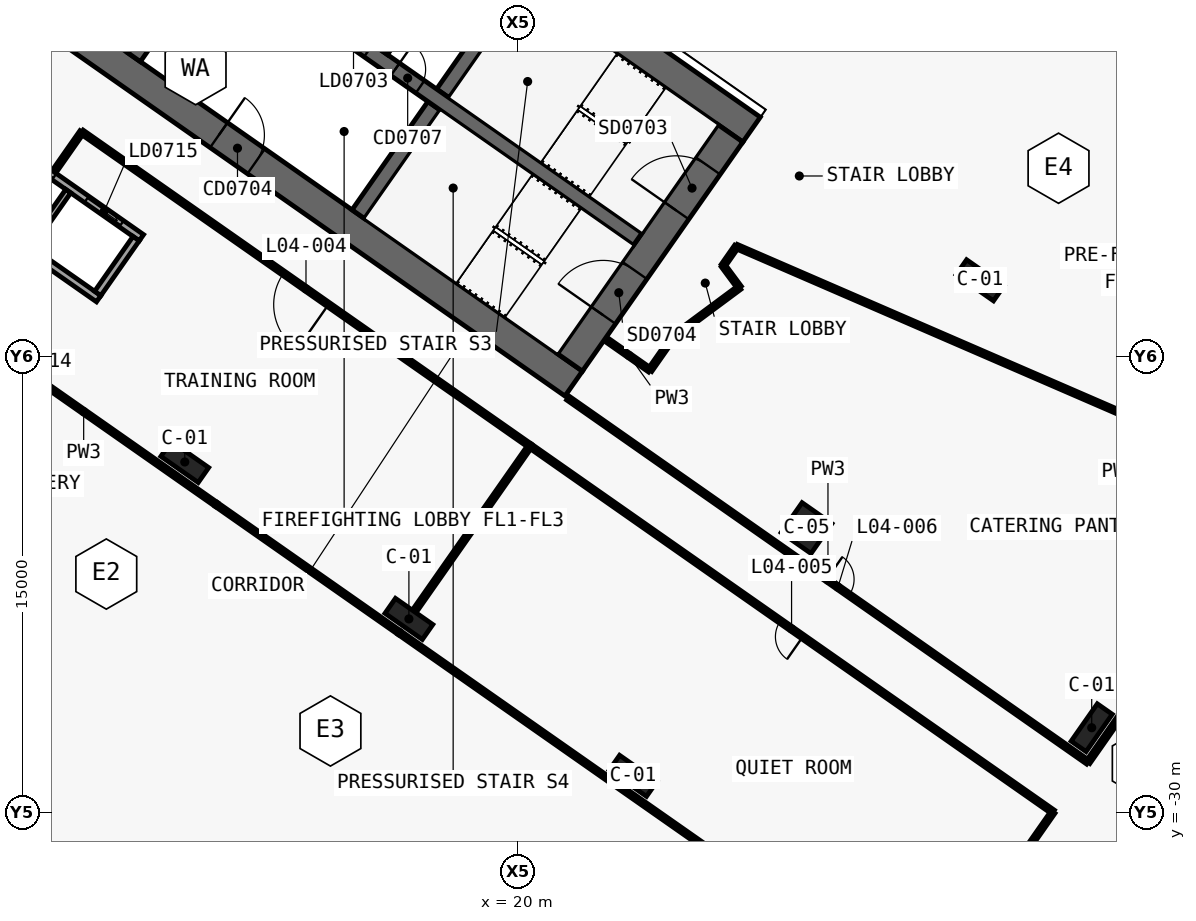
"""IFC4 building model, lengths in metres.
Left out: names, types, materials, properties, quantities, classifications, styles, units other than length and angle.
Written with IfcOpenShell. Run it as: python <this file> out.ifc"""

import sys

from ifc_helpers import new_model, si_unit, direction, frame, frame_2d, origin, origin_2d, place, context, subcontext, project, spatial, polyline, rectangle, outline, extrude, element, fill, save


model = new_model("IFC4")
c1 = context("Model", 3, precision=1e-05, world=origin(), true_north=direction((0.0, 1.0)))
c2 = subcontext(c1, "Body", "Model", "MODEL_VIEW")
j1 = project(units=[si_unit("LENGTHUNIT", "METRE"), si_unit("PLANEANGLEUNIT", "RADIAN")], contexts=[c1])
p1 = place(None, origin())
s1 = spatial("IfcSite", under=j1, at=p1, CompositionType="ELEMENT")
p2 = place(p1, origin())
s2 = spatial("IfcBuilding", under=s1, at=p2, CompositionType="ELEMENT")
p3 = place(p2, frame((0.0, 0.0, 32.0)))
s3 = spatial("IfcBuildingStorey", under=s2, at=p3, CompositionType="ELEMENT", Elevation=32.0)
p4 = place(p3, frame((-0.037, 11.867, 0.0), z_axis=(0.0, 0.0, 1.0), x_axis=(0.819155306259, -0.573571777746, 0.0)))
e1 = element("IfcWall", 1, at=p4, inside=s3, PredefinedType="SHEAR", context=c2, shape_type="SweptSolid", body=[
    extrude(outline(polyline([(33.837, 0.5), (0.0, 0.5), (0.7, -0.5), (33.837, -0.5), (33.837, 0.5)])), origin(), (0.0, 0.0, 1.0), 5.5),
])
p5 = place(p3, frame((-0.037, -0.585, 0.0), z_axis=(0.0, 0.0, 1.0), x_axis=(0.819157152511, -0.573569140985, 0.0)))
e2 = element("IfcWall", 2, at=p5, inside=s3, PredefinedType="SHEAR", context=c2, shape_type="SweptSolid", body=[
    extrude(outline(polyline([(26.695, 0.5), (0.0, 0.5), (0.7, -0.5), (26.695, -0.5), (26.695, 0.5)])), origin(), (0.0, 0.0, 1.0), 5.5),
])
p6 = place(p5, frame((1.045, 0.0, 0.0)))
e3 = element("IfcOpeningElement", 3, at=p6, cuts=e2, PredefinedType="OPENING", context=c2, shape_type="SweptSolid", body=[
    extrude(rectangle(XDim=1.5, YDim=2.1, at=frame_2d((0.75, 1.05))), frame((0.0, 0.51, 0.0), z_axis=(0.0, -1.0, 0.0), x_axis=(1.0, 0.0, 0.0)), (0.0, 0.0, 1.0), 1.02),
])
p7 = place(p5, frame((12.445, 0.0, 0.0)))
e4 = element("IfcOpeningElement", 4, at=p7, cuts=e2, PredefinedType="OPENING", context=c2, shape_type="SweptSolid", body=[
    extrude(rectangle(XDim=1.5, YDim=2.1, at=frame_2d((0.75, 1.05))), frame((0.0, 0.51, 0.0), z_axis=(0.0, -1.0, 0.0), x_axis=(1.0, 0.0, 0.0)), (0.0, 0.0, 1.0), 1.02),
])
p8 = place(p3, frame((21.708, -15.2, 0.0), z_axis=(0.0, 0.0, 1.0), x_axis=(0.573576324356, 0.819152122709, 0.0)))
e5 = element("IfcWall", 5, at=p8, inside=s3, PredefinedType="SHEAR", context=c2, shape_type="SweptSolid", body=[
    extrude(outline(polyline([(9.2, 0.5), (0.0, 0.5), (0.0, -0.5), (9.2, -0.5), (9.2, 0.5)])), origin(), (0.0, 0.0, 1.0), 5.5),
])
p9 = place(p8, frame((6.1, 0.0, 0.0)))
e6 = element("IfcOpeningElement", 6, at=p9, cuts=e5, PredefinedType="OPENING", context=c2, shape_type="SweptSolid", body=[
    extrude(rectangle(XDim=1.8, YDim=2.1, at=frame_2d((0.9, 1.05))), frame((0.0, 0.51, 0.0), z_axis=(0.0, -1.0, 0.0), x_axis=(1.0, 0.0, 0.0)), (0.0, 0.0, 1.0), 1.02),
])
p10 = place(p8, frame((1.9, 0.0, 0.0)))
e7 = element("IfcOpeningElement", 7, at=p10, cuts=e5, PredefinedType="OPENING", context=c2, shape_type="SweptSolid", body=[
    extrude(rectangle(XDim=1.8, YDim=2.1, at=frame_2d((0.9, 1.05))), frame((0.0, 0.51, 0.0), z_axis=(0.0, -1.0, 0.0), x_axis=(1.0, 0.0, 0.0)), (0.0, 0.0, 1.0), 1.02),
])
p11 = place(p3, frame((7.372, -5.162, 0.0), z_axis=(0.0, 0.0, 1.0), x_axis=(0.573594173421, 0.819139624372, 0.0)))
e8 = element("IfcWall", 8, at=p11, inside=s3, PredefinedType="SHEAR", context=c2, shape_type="SweptSolid", body=[
    extrude(outline(polyline([(0.0, 0.25), (0.0, -0.25), (4.35, -0.25), (4.35, 0.25), (0.0, 0.25)])), origin(), (0.0, 0.0, 1.0), 5.5),
])
p12 = place(p3, frame((14.745, -10.324, 0.0), z_axis=(0.0, 0.0, 1.0), x_axis=(0.57356780395, 0.819158088694, 0.0)))
e9 = element("IfcWall", 9, at=p12, inside=s3, PredefinedType="SHEAR", context=c2, shape_type="SweptSolid", body=[
    extrude(outline(polyline([(0.0, 0.25), (0.0, -0.25), (4.35, -0.25), (4.35, 0.25), (0.0, 0.25)])), origin(), (0.0, 0.0, 1.0), 5.5),
])
p13 = place(p3, frame((17.527, -6.352, 0.0), z_axis=(0.0, 0.0, 1.0), x_axis=(0.573530143085, 0.819184457233, 0.0)))
e10 = element("IfcWall", 10, at=p13, inside=s3, PredefinedType="SHEAR", context=c2, shape_type="SweptSolid", body=[
    extrude(outline(polyline([(4.35, -0.25), (4.35, 0.25), (0.0, 0.25), (0.0, -0.25), (4.35, -0.25)])), origin(), (0.0, 0.0, 1.0), 5.5),
])
p14 = place(p3, frame((2.638, 3.768, 0.0), z_axis=(0.0, 0.0, 1.0), x_axis=(0.819148977158, -0.573580816643, 0.0)))
e11 = element("IfcWall", 11, at=p14, inside=s3, PredefinedType="SHEAR", context=c2, shape_type="SweptSolid", body=[
    extrude(outline(polyline([(0.0, 0.25), (0.0, -0.25), (26.0, -0.25), (26.0, 0.25), (0.0, 0.25)])), origin(), (0.0, 0.0, 1.0), 5.5),
])
p15 = place(p14, frame((9.637, 0.0, 0.0)))
e12 = element("IfcOpeningElement", 12, at=p15, cuts=e11, PredefinedType="OPENING", context=c2, shape_type="SweptSolid", body=[
    extrude(rectangle(XDim=1.2, YDim=2.1, at=frame_2d((0.6, 1.05))), frame((0.0, 0.26, 0.0), z_axis=(0.0, -1.0, 0.0), x_axis=(1.0, 0.0, 0.0)), (0.0, 0.0, 1.0), 0.52),
])
p16 = place(p14, frame((11.812, 0.0, 0.0)))
e13 = element("IfcOpeningElement", 13, at=p16, cuts=e11, PredefinedType="OPENING", context=c2, shape_type="SweptSolid", body=[
    extrude(rectangle(XDim=1.2, YDim=2.1, at=frame_2d((0.6, 1.05))), frame((0.0, 0.26, 0.0), z_axis=(0.0, -1.0, 0.0), x_axis=(1.0, 0.0, 0.0)), (0.0, 0.0, 1.0), 0.52),
])
p17 = place(p14, frame((13.988, 0.0, 0.0)))
e14 = element("IfcOpeningElement", 14, at=p17, cuts=e11, PredefinedType="OPENING", context=c2, shape_type="SweptSolid", body=[
    extrude(rectangle(XDim=1.2, YDim=2.1, at=frame_2d((0.6, 1.05))), frame((0.0, 0.26, 0.0), z_axis=(0.0, -1.0, 0.0), x_axis=(1.0, 0.0, 0.0)), (0.0, 0.0, 1.0), 0.52),
])
p18 = place(p14, frame((16.262, 0.0, 0.0)))
e15 = element("IfcOpeningElement", 15, at=p18, cuts=e11, PredefinedType="OPENING", context=c2, shape_type="SweptSolid", body=[
    extrude(rectangle(XDim=1.0, YDim=2.1, at=frame_2d((0.5, 1.05))), frame((0.0, 0.26, 0.0), z_axis=(0.0, -1.0, 0.0), x_axis=(1.0, 0.0, 0.0)), (0.0, 0.0, 1.0), 0.52),
])
for number, where, z_axis, x_axis in (
    (16, (9.038, -18.475, 0.0), (0.0, 0.0, 1.0), (0.819, -0.574, 0.0)),
    (17, (16.41, -23.637, 0.0), (0.0, 0.0, 1.0), (0.819, -0.574, 0.0)),
    (18, (23.782, -28.799, 0.0), (0.0, 0.0, 1.0), (0.819, -0.574, 0.0)),
    (19, (35.197, -12.498, 0.0), (0.0, 0.0, 1.0), (0.819, -0.574, 0.0)),
    (20, (38.869, -27.216, 0.0), (0.0, 0.0, 1.0), (0.574, 0.819, 0.0)),
):
    element("IfcColumn", number, at=place(p3, frame(where, z_axis=z_axis, x_axis=x_axis)), inside=s3, PredefinedType="COLUMN", context=c2, shape_type="SweptSolid", body=[
        extrude(rectangle(XDim=1.5, YDim=0.6, at=origin_2d()), origin(), (0.0, 0.0, 1.0), 5.5),
    ])
p19 = place(p3, frame((29.49, -20.649, 0.0), z_axis=(0.0, 0.0, 1.0), x_axis=(0.819152044289, -0.573576436351, 0.0)))
e21 = element("IfcColumn", 21, at=p19, inside=s3, PredefinedType="COLUMN", context=c2, shape_type="SweptSolid", body=[
    extrude(rectangle(XDim=1.2, YDim=1.2, at=origin_2d()), origin(), (0.0, 0.0, 1.0), 5.5),
])
p20 = place(p3, frame((15.622, -5.018, 0.0), z_axis=(0.0, 0.0, 1.0), x_axis=(0.573594173421, 0.819139624372, 0.0)))
e22 = element("IfcWall", 22, at=p20, inside=s3, PredefinedType="SOLIDWALL", context=c2, shape_type="SweptSolid", body=[
    extrude(rectangle(XDim=4.35, YDim=0.2, at=frame_2d((2.175, 0.0))), origin(), (0.0, 0.0, 1.0), 5.5),
])
p21 = place(p3, frame((-2.887, -6.738, 0.0), z_axis=(0.0, 0.0, 1.0), x_axis=(0.819150280716, -0.573578954985, 0.0)))
e23 = element("IfcWall", 23, at=p21, inside=s3, PredefinedType="SOLIDWALL", context=c2, shape_type="SweptSolid", body=[
    extrude(rectangle(XDim=11.1, YDim=0.25, at=frame_2d((5.55, 0.0))), origin(), (0.0, 0.0, 1.0), 5.5),
])
p22 = place(p3, frame((-1.481, -4.731, 0.0), z_axis=(0.0, 0.0, 1.0), x_axis=(0.819150280716, -0.573578954985, 0.0)))
e24 = element("IfcWall", 24, at=p22, inside=s3, PredefinedType="SOLIDWALL", context=c2, shape_type="SweptSolid", body=[
    extrude(rectangle(XDim=11.1, YDim=0.25, at=frame_2d((5.55, 0.0))), origin(), (0.0, 0.0, 1.0), 5.5),
])
p23 = place(p22, frame((0.8, 0.0, 0.0)))
e25 = element("IfcOpeningElement", 25, at=p23, cuts=e24, PredefinedType="OPENING", context=c2, shape_type="SweptSolid", body=[
    extrude(rectangle(XDim=1.4, YDim=2.1, at=frame_2d((0.7, 1.05))), frame((0.0, 0.135, 0.0), z_axis=(0.0, -1.0, 0.0), x_axis=(1.0, 0.0, 0.0)), (0.0, 0.0, 1.0), 0.27),
])
p24 = place(p22, frame((3.5, 0.0, 0.0)))
e26 = element("IfcOpeningElement", 26, at=p24, cuts=e24, PredefinedType="OPENING", context=c2, shape_type="SweptSolid", body=[
    extrude(rectangle(XDim=1.4, YDim=2.1, at=frame_2d((0.7, 1.05))), frame((0.0, 0.135, 0.0), z_axis=(0.0, -1.0, 0.0), x_axis=(1.0, 0.0, 0.0)), (0.0, 0.0, 1.0), 0.27),
])
p25 = place(p22, frame((6.2, 0.0, 0.0)))
e27 = element("IfcOpeningElement", 27, at=p25, cuts=e24, PredefinedType="OPENING", context=c2, shape_type="SweptSolid", body=[
    extrude(rectangle(XDim=1.4, YDim=2.1, at=frame_2d((0.7, 1.05))), frame((0.0, 0.135, 0.0), z_axis=(0.0, -1.0, 0.0), x_axis=(1.0, 0.0, 0.0)), (0.0, 0.0, 1.0), 0.27),
])
p26 = place(p22, frame((8.9, 0.0, 0.0)))
e28 = element("IfcOpeningElement", 28, at=p26, cuts=e24, PredefinedType="OPENING", context=c2, shape_type="SweptSolid", body=[
    extrude(rectangle(XDim=1.4, YDim=2.1, at=frame_2d((0.7, 1.05))), frame((0.0, 0.135, 0.0), z_axis=(0.0, -1.0, 0.0), x_axis=(1.0, 0.0, 0.0)), (0.0, 0.0, 1.0), 0.27),
])
p27 = place(p3, frame((6.175, -12.93, 0.0), z_axis=(0.0, 0.0, 1.0), x_axis=(0.573559170999, 0.819164133348, 0.0)))
e29 = element("IfcWall", 29, at=p27, inside=s3, PredefinedType="SOLIDWALL", context=c2, shape_type="SweptSolid", body=[
    extrude(rectangle(XDim=2.2, YDim=0.25, at=frame_2d((1.1, 0.0))), origin(), (0.0, 0.0, 1.0), 5.5),
])
p28 = place(p3, frame((3.943, -11.367, 0.0), z_axis=(0.0, 0.0, 1.0), x_axis=(0.573507030513, 0.819200638399, 0.0)))
e30 = element("IfcWall", 30, at=p28, inside=s3, PredefinedType="SOLIDWALL", context=c2, shape_type="SweptSolid", body=[
    extrude(rectangle(XDim=2.2, YDim=0.2, at=frame_2d((1.1, 0.0))), origin(), (0.0, 0.0, 1.0), 5.5),
])
p29 = place(p3, frame((21.642, -16.375, 0.0), z_axis=(0.0, 0.0, 1.0), x_axis=(0.819148965066, -0.573580833911, 0.0)))
e31 = element("IfcWall", 31, at=p29, inside=s3, PredefinedType="PARTITIONING", context=c2, shape_type="SweptSolid", body=[
    extrude(rectangle(XDim=20.88, YDim=0.15, at=frame_2d((10.44, 0.0))), origin(), (0.0, 0.0, 1.0), 3.68),
])
p30 = place(p29, frame((10.39, 0.0, 0.0)))
e32 = element("IfcOpeningElement", 32, at=p30, cuts=e31, PredefinedType="OPENING", context=c2, shape_type="SweptSolid", body=[
    extrude(rectangle(XDim=0.9, YDim=2.1, at=frame_2d((0.45, 1.05))), frame((0.0, 0.085, 0.0), z_axis=(0.0, -1.0, 0.0), x_axis=(1.0, 0.0, 0.0)), (0.0, 0.0, 1.0), 0.17),
])
p31 = place(p3, frame((20.398, -17.945, 0.0), z_axis=(0.0, 0.0, 1.0), x_axis=(-0.819147172988, 0.573583393228, 0.0)))
e33 = element("IfcWall", 33, at=p31, inside=s3, PredefinedType="PARTITIONING", context=c2, shape_type="SweptSolid", body=[
    extrude(rectangle(XDim=18.002, YDim=0.15, at=frame_2d((9.001, 0.0))), origin(), (0.0, 0.0, 1.0), 3.68),
])
p32 = place(p31, frame((8.101, 0.0, 0.0)))
e34 = element("IfcOpeningElement", 34, at=p32, cuts=e33, PredefinedType="OPENING", context=c2, shape_type="SweptSolid", body=[
    extrude(rectangle(XDim=1.8, YDim=2.4, at=frame_2d((0.9, 1.2))), frame((0.0, 0.085, 0.0), z_axis=(0.0, -1.0, 0.0), x_axis=(1.0, 0.0, 0.0)), (0.0, 0.0, 1.0), 0.17),
])
p33 = place(p3, frame((37.599, -29.989, 0.0), z_axis=(0.0, 0.0, 1.0), x_axis=(-0.819154909514, 0.573572344364, 0.0)))
e35 = element("IfcWall", 35, at=p33, inside=s3, PredefinedType="PARTITIONING", context=c2, shape_type="SweptSolid", body=[
    extrude(rectangle(XDim=21.002, YDim=0.15, at=frame_2d((10.501, 0.0))), origin(), (0.0, 0.0, 1.0), 3.68),
])
p34 = place(p33, frame((10.051, 0.0, 0.0)))
e36 = element("IfcOpeningElement", 36, at=p34, cuts=e35, PredefinedType="OPENING", context=c2, shape_type="SweptSolid", body=[
    extrude(rectangle(XDim=0.9, YDim=2.1, at=frame_2d((0.45, 1.05))), frame((0.0, 0.085, 0.0), z_axis=(0.0, -1.0, 0.0), x_axis=(1.0, 0.0, 0.0)), (0.0, 0.0, 1.0), 0.17),
])
p35 = place(p3, frame((43.621, -21.388, 0.0), z_axis=(0.0, 0.0, 1.0), x_axis=(-0.57357799764, -0.819150951061, 0.0)))
e37 = element("IfcWall", 37, at=p35, inside=s3, PredefinedType="PARTITIONING", context=c2, shape_type="SweptSolid", body=[
    extrude(rectangle(XDim=8.5, YDim=0.15, at=frame_2d((4.25, 0.0))), origin(), (0.0, 0.0, 1.0), 5.1),
])
p36 = place(p3, frame((26.746, -12.014, 0.0), z_axis=(0.0, 0.0, 1.0), x_axis=(0.573761975376, 0.819022097146, 0.0)))
e38 = element("IfcWall", 38, at=p36, inside=s3, PredefinedType="PARTITIONING", context=c2, shape_type="SweptSolid", body=[
    extrude(rectangle(XDim=0.765, YDim=0.15, at=frame_2d((0.383, 0.0))), origin(), (0.0, 0.0, 1.0), 5.1),
])
p37 = place(p3, frame((27.185, -11.387, 0.0), z_axis=(0.0, 0.0, 1.0), x_axis=(0.917531384635, -0.397663372979, 0.0)))
e39 = element("IfcWall", 39, at=p37, inside=s3, PredefinedType="PARTITIONING", context=c2, shape_type="SweptSolid", body=[
    extrude(rectangle(XDim=16.536, YDim=0.15, at=frame_2d((8.268, 0.0))), origin(), (0.0, 0.0, 1.0), 3.68),
])
p38 = place(p3, frame((22.961, -14.49, 0.0), z_axis=(0.0, 0.0, 1.0), x_axis=(0.819109000826, -0.573637903879, 0.0)))
e40 = element("IfcWall", 40, at=p38, inside=s3, PredefinedType="PARTITIONING", context=c2, shape_type="SweptSolid", body=[
    extrude(rectangle(XDim=1.68, YDim=0.15, at=frame_2d((0.84, 0.0))), origin(), (0.0, 0.0, 1.0), 5.1),
])
p39 = place(p3, frame((24.337, -15.454, 0.0), z_axis=(0.0, 0.0, 1.0), x_axis=(0.573571252353, 0.819155674139, 0.0)))
e41 = element("IfcWall", 41, at=p39, inside=s3, PredefinedType="PARTITIONING", context=c2, shape_type="SweptSolid", body=[
    extrude(rectangle(XDim=1.354, YDim=0.15, at=frame_2d((0.677, 0.0))), origin(), (0.0, 0.0, 1.0), 5.1),
])
p40 = place(p3, frame((25.114, -14.345, 0.0), z_axis=(0.0, 0.0, 1.0), x_axis=(0.803211070557, 0.595694532571, 0.0)))
e42 = element("IfcWall", 42, at=p40, inside=s3, PredefinedType="PARTITIONING", context=c2, shape_type="SweptSolid", body=[
    extrude(rectangle(XDim=2.7, YDim=0.15, at=frame_2d((1.35, 0.0))), origin(), (0.0, 0.0, 1.0), 5.1),
])
p41 = place(p3, frame((27.282, -12.737, 0.0), z_axis=(0.0, 0.0, 1.0), x_axis=(-0.595869495235, 0.803081281471, 0.0)))
e43 = element("IfcWall", 43, at=p41, inside=s3, PredefinedType="PARTITIONING", context=c2, shape_type="SweptSolid", body=[
    extrude(rectangle(XDim=0.9, YDim=0.15, at=frame_2d((0.45, 0.0))), origin(), (0.0, 0.0, 1.0), 5.1),
])
p42 = place(p3, frame((20.396, -17.944, 0.0), z_axis=(0.0, 0.0, 1.0), x_axis=(-0.57359826181, -0.819136761505, 0.0)))
e44 = element("IfcWall", 44, at=p42, inside=s3, PredefinedType="PARTITIONING", context=c2, shape_type="SweptSolid", body=[
    extrude(rectangle(XDim=6.63, YDim=0.15, at=frame_2d((3.315, 0.0))), origin(), (0.0, 0.0, 1.0), 3.68),
])
p43 = place(p3, frame((16.094, -24.088, 0.0), z_axis=(0.0, 0.0, 1.0), x_axis=(-0.819155454297, 0.573571566324, 0.0)))
e45 = element("IfcWall", 45, at=p43, inside=s3, PredefinedType="PARTITIONING", context=c2, shape_type="SweptSolid", body=[
    extrude(rectangle(XDim=7.351, YDim=0.15, at=frame_2d((3.675, 0.0))), origin(), (0.0, 0.0, 1.0), 5.1),
])
p44 = place(p3, frame((10.075, -19.873, 0.0), z_axis=(0.0, 0.0, 1.0), x_axis=(-0.819148998885, 0.573580785615, 0.0)))
e46 = element("IfcWall", 46, at=p44, inside=s3, PredefinedType="PARTITIONING", context=c2, shape_type="SweptSolid", body=[
    extrude(rectangle(XDim=10.652, YDim=0.15, at=frame_2d((5.326, 0.0))), origin(), (0.0, 0.0, 1.0), 4.08),
])
p45 = place(p3, frame((4.763, -8.889, 0.0), z_axis=(0.0, 0.0, 1.0), x_axis=(0.573494057365, 0.819209720504, 0.0)))
e47 = element("IfcWall", 47, at=p45, inside=s3, PredefinedType="PARTITIONING", context=c2, shape_type="SweptSolid", body=[
    extrude(rectangle(XDim=1.55, YDim=0.15, at=frame_2d((0.775, 0.0))), origin(), (0.0, 0.0, 1.0), 3.68),
])
p46 = place(p3, frame((30.839, -34.412, 0.0), z_axis=(0.0, 0.0, 1.0), x_axis=(-0.81915226268, 0.573576124456, 0.0)))
e48 = element("IfcWall", 48, at=p46, inside=s3, PredefinedType="PARTITIONING", context=c2, shape_type="SweptSolid", body=[
    extrude(rectangle(XDim=18.0, YDim=0.15, at=frame_2d((9.0, 0.0))), origin(), (0.0, 0.0, 1.0), 5.1),
])
p47 = place(p3, frame((37.599, -29.989, 0.0), z_axis=(0.0, 0.0, 1.0), x_axis=(-0.573575034625, -0.819153025786, 0.0)))
e49 = element("IfcWall", 49, at=p47, inside=s3, PredefinedType="PARTITIONING", context=c2, shape_type="SweptSolid", body=[
    extrude(rectangle(XDim=1.745, YDim=0.15, at=frame_2d((0.872, 0.0))), origin(), (0.0, 0.0, 1.0), 5.1),
])
p48 = place(p18, origin())
e50 = element("IfcDoor", 50, at=p48, inside=s3, OperationType="SINGLE_SWING_RIGHT", PredefinedType="DOOR", context=c2, shape_type="SweptSolid", body=[
    extrude(rectangle(XDim=1.0, YDim=2.1, at=frame_2d((0.5, 1.05))), frame((0.0, 0.025, 0.0), z_axis=(0.0, -1.0, 0.0), x_axis=(1.0, 0.0, 0.0)), (0.0, 0.0, 1.0), 0.05),
])
fill(e15, e50)
p49 = place(p7, origin())
e51 = element("IfcDoor", 51, at=p49, inside=s3, OperationType="DOUBLE_DOOR_SINGLE_SWING", PredefinedType="DOOR", context=c2, shape_type="SweptSolid", body=[
    extrude(rectangle(XDim=1.5, YDim=2.1, at=frame_2d((0.75, 1.05))), frame((0.0, 0.025, 0.0), z_axis=(0.0, -1.0, 0.0), x_axis=(1.0, 0.0, 0.0)), (0.0, 0.0, 1.0), 0.05),
])
fill(e4, e51)
p50 = place(p9, origin())
e52 = element("IfcDoor", 52, at=p50, inside=s3, OperationType="DOUBLE_DOOR_SINGLE_SWING", PredefinedType="DOOR", context=c2, shape_type="SweptSolid", body=[
    extrude(rectangle(XDim=1.8, YDim=2.1, at=frame_2d((0.9, 1.05))), frame((0.0, 0.025, 0.0), z_axis=(0.0, -1.0, 0.0), x_axis=(1.0, 0.0, 0.0)), (0.0, 0.0, 1.0), 0.05),
])
fill(e6, e52)
p51 = place(p10, origin())
e53 = element("IfcDoor", 53, at=p51, inside=s3, OperationType="DOUBLE_DOOR_SINGLE_SWING", PredefinedType="DOOR", context=c2, shape_type="SweptSolid", body=[
    extrude(rectangle(XDim=1.8, YDim=2.1, at=frame_2d((0.9, 1.05))), frame((0.0, 0.025, 0.0), z_axis=(0.0, -1.0, 0.0), x_axis=(1.0, 0.0, 0.0)), (0.0, 0.0, 1.0), 0.05),
])
fill(e7, e53)
p52 = place(p25, origin())
e54 = element("IfcDoor", 54, at=p52, inside=s3, OperationType="SLIDING_TO_LEFT", PredefinedType="DOOR", context=c2, shape_type="SweptSolid", body=[
    extrude(rectangle(XDim=1.4, YDim=2.1, at=frame_2d((0.7, 1.05))), frame((0.0, 0.025, 0.0), z_axis=(0.0, -1.0, 0.0), x_axis=(1.0, 0.0, 0.0)), (0.0, 0.0, 1.0), 0.05),
])
fill(e27, e54)
p53 = place(p26, origin())
e55 = element("IfcDoor", 55, at=p53, inside=s3, OperationType="SLIDING_TO_RIGHT", PredefinedType="DOOR", context=c2, shape_type="SweptSolid", body=[
    extrude(rectangle(XDim=1.4, YDim=2.1, at=frame_2d((0.7, 1.05))), frame((0.0, 0.025, 0.0), z_axis=(0.0, -1.0, 0.0), x_axis=(1.0, 0.0, 0.0)), (0.0, 0.0, 1.0), 0.05),
])
fill(e28, e55)
p54 = place(p32, origin())
e56 = element("IfcDoor", 56, at=p54, inside=s3, OperationType="DOUBLE_DOOR_SINGLE_SWING", PredefinedType="DOOR", context=c2, shape_type="SweptSolid", body=[
    extrude(rectangle(XDim=1.8, YDim=2.4, at=frame_2d((0.9, 1.2))), frame((0.0, 0.025, 0.0), z_axis=(0.0, -1.0, 0.0), x_axis=(1.0, 0.0, 0.0)), (0.0, 0.0, 1.0), 0.05),
])
fill(e34, e56)
p55 = place(p34, origin())
e57 = element("IfcDoor", 57, at=p55, inside=s3, OperationType="SINGLE_SWING_RIGHT", PredefinedType="DOOR", context=c2, shape_type="SweptSolid", body=[
    extrude(rectangle(XDim=0.9, YDim=2.1, at=frame_2d((0.45, 1.05))), frame((0.0, 0.025, 0.0), z_axis=(0.0, -1.0, 0.0), x_axis=(1.0, 0.0, 0.0)), (0.0, 0.0, 1.0), 0.05),
])
fill(e36, e57)
p56 = place(p30, origin())
e58 = element("IfcDoor", 58, at=p56, inside=s3, OperationType="SINGLE_SWING_RIGHT", PredefinedType="DOOR", context=c2, shape_type="SweptSolid", body=[
    extrude(rectangle(XDim=0.9, YDim=2.1, at=frame_2d((0.45, 1.05))), frame((0.0, 0.025, 0.0), z_axis=(0.0, -1.0, 0.0), x_axis=(1.0, 0.0, 0.0)), (0.0, 0.0, 1.0), 0.05),
])
fill(e32, e58)
save(model, sys.argv[1])
